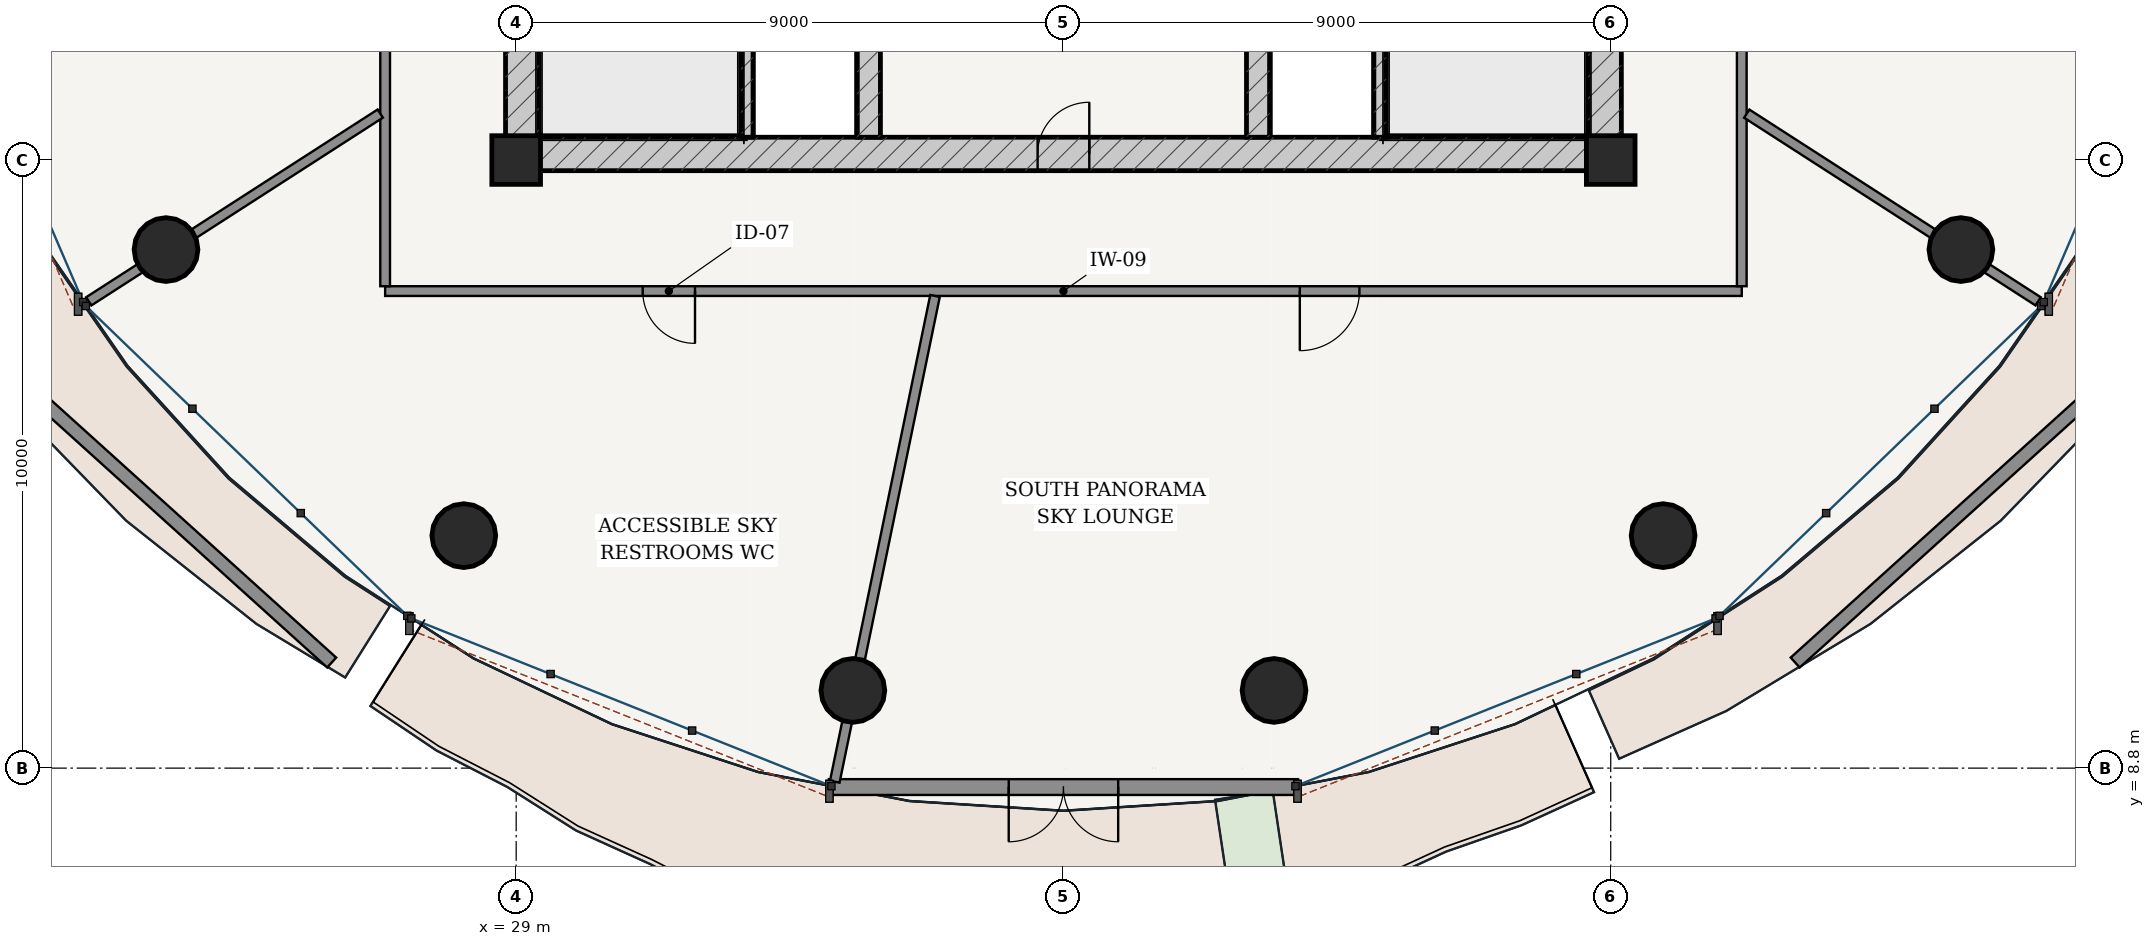
"""IFC4 building model, lengths in metres.
Left out: names, types, materials, properties, quantities, classifications, styles, units other than length and angle.
Written with IfcOpenShell. Run it as: python <this file> out.ifc"""

import sys

from ifc_helpers import new_model, si_unit, direction, frame, frame_2d, origin, origin_2d, place, context, subcontext, project, spatial, rectangle, hollow_circle, extrude, source, transform, mapped, element, fill, save


model = new_model("IFC4")
c1 = context("Model", 3, precision=1e-05, world=origin(), true_north=direction((-0.2419218956, 0.970295726276)))
c2 = subcontext(c1, "Body", "Model", "MODEL_VIEW")
j1 = project(units=[si_unit("LENGTHUNIT", "METRE"), si_unit("PLANEANGLEUNIT", "RADIAN")], contexts=[c1])
p1 = place(None, origin())
s1 = spatial("IfcSite", under=j1, at=p1, CompositionType="ELEMENT")
p2 = place(p1, origin())
s2 = spatial("IfcBuilding", under=s1, at=p2, CompositionType="ELEMENT")
p3 = place(p2, frame((0.0, 0.0, 243.0)))
s3 = spatial("IfcBuildingStorey", under=s2, at=p3, CompositionType="ELEMENT", Elevation=243.0)
for number, where, z_axis, x_axis in (
    (1, (29.0, 18.8, 0.0), (0.0, 0.0, 1.0), (1.0, 0.0, 0.0)),
    (2, (47.0, 18.8, 0.0), (0.0, 0.0, 1.0), (1.0, 0.0, 0.0)),
):
    element("IfcColumn", number, at=place(p3, frame(where, z_axis=z_axis, x_axis=x_axis)), inside=s3, PredefinedType="COLUMN", context=c2, shape_type="SweptSolid", body=[
        extrude(rectangle(XDim=0.8, YDim=0.8, at=origin_2d()), origin(), (0.0, 0.0, 1.0), 5.2),
    ])
p4 = place(p3, frame((28.825, 18.9, 0.0), z_axis=(0.0, 0.0, 1.0), x_axis=(1.0, 0.0, 0.0)))
e3 = element("IfcWall", 3, at=p4, inside=s3, PredefinedType="SHEAR", context=c2, shape_type="SweptSolid", body=[
    extrude(rectangle(XDim=18.35, YDim=0.55, at=frame_2d((9.175, 0.0))), origin(), (0.0, 0.0, 1.0), 4.94),
])
p5 = place(p4, frame((8.75, 0.0, 0.0)))
e4 = element("IfcOpeningElement", 4, at=p5, cuts=e3, PredefinedType="OPENING", context=c2, shape_type="SweptSolid", body=[
    extrude(rectangle(XDim=0.85, YDim=2.1, at=frame_2d((0.425, 1.05))), frame((0.0, 0.285, 0.0), z_axis=(0.0, -1.0, 0.0), x_axis=(1.0, 0.0, 0.0)), (0.0, 0.0, 1.0), 0.57),
])
p6 = place(p3, frame((29.1, 19.175, 0.0), z_axis=(0.0, 0.0, 1.0), x_axis=(0.0, 1.0, 0.0)))
e5 = element("IfcWall", 5, at=p6, inside=s3, PredefinedType="SHEAR", context=c2, shape_type="SweptSolid", body=[
    extrude(rectangle(XDim=15.25, YDim=0.55, at=frame_2d((7.625, 0.0))), origin(), (0.0, 0.0, 1.0), 4.94),
])
p7 = place(p6, frame((9.875, 0.0, 0.0)))
e6 = element("IfcOpeningElement", 6, at=p7, cuts=e5, PredefinedType="OPENING", context=c2, shape_type="SweptSolid", body=[
    extrude(rectangle(XDim=1.5, YDim=2.2, at=frame_2d((0.75, 1.1))), frame((0.0, 0.285, 0.0), z_axis=(0.0, -1.0, 0.0), x_axis=(1.0, 0.0, 0.0)), (0.0, 0.0, 1.0), 0.57),
])
p8 = place(p3, frame((46.9, 19.175, 0.0), z_axis=(0.0, 0.0, 1.0), x_axis=(0.0, 1.0, 0.0)))
e7 = element("IfcWall", 7, at=p8, inside=s3, PredefinedType="SHEAR", context=c2, shape_type="SweptSolid", body=[
    extrude(rectangle(XDim=15.25, YDim=0.55, at=frame_2d((7.625, 0.0))), origin(), (0.0, 0.0, 1.0), 4.94),
])
p9 = place(p8, frame((9.875, 0.0, 0.0)))
e8 = element("IfcOpeningElement", 8, at=p9, cuts=e7, PredefinedType="OPENING", context=c2, shape_type="SweptSolid", body=[
    extrude(rectangle(XDim=1.5, YDim=2.2, at=frame_2d((0.75, 1.1))), frame((0.0, 0.285, 0.0), z_axis=(0.0, -1.0, 0.0), x_axis=(1.0, 0.0, 0.0)), (0.0, 0.0, 1.0), 0.57),
])
for number, where, z_axis, x_axis in (
    (9, (32.795, 19.175, 0.0), (0.0, 0.0, 1.0), (0.0, 1.0, 0.0)),
    (10, (43.205, 19.175, 0.0), (0.0, 0.0, 1.0), (0.0, 1.0, 0.0)),
):
    element("IfcWall", number, at=place(p3, frame(where, z_axis=z_axis, x_axis=x_axis)), inside=s3, PredefinedType="SOLIDWALL", context=c2, shape_type="SweptSolid", body=[
        extrude(rectangle(XDim=7.375, YDim=0.2, at=frame_2d((3.688, 0.0))), origin(), (0.0, 0.0, 1.0), 4.94),
    ])
p10 = place(p3, frame((34.8, 19.175, 0.0), z_axis=(0.0, 0.0, 1.0), x_axis=(0.0, 1.0, 0.0)))
e11 = element("IfcWall", 11, at=p10, inside=s3, PredefinedType="SHEAR", context=c2, shape_type="SweptSolid", body=[
    extrude(rectangle(XDim=15.25, YDim=0.38, at=frame_2d((7.625, 0.0))), origin(), (0.0, 0.0, 1.0), 4.94),
])
p11 = place(p10, frame((7.8, 0.0, 0.0)))
e12 = element("IfcOpeningElement", 12, at=p11, cuts=e11, PredefinedType="OPENING", context=c2, shape_type="SweptSolid", body=[
    extrude(rectangle(XDim=1.05, YDim=2.15, at=frame_2d((0.525, 1.075))), frame((0.0, 0.2, 0.0), z_axis=(0.0, -1.0, 0.0), x_axis=(1.0, 0.0, 0.0)), (0.0, 0.0, 1.0), 0.4),
])
p12 = place(p3, frame((41.2, 19.175, 0.0), z_axis=(0.0, 0.0, 1.0), x_axis=(0.0, 1.0, 0.0)))
e13 = element("IfcWall", 13, at=p12, inside=s3, PredefinedType="SHEAR", context=c2, shape_type="SweptSolid", body=[
    extrude(rectangle(XDim=15.25, YDim=0.38, at=frame_2d((7.625, 0.0))), origin(), (0.0, 0.0, 1.0), 4.94),
])
p13 = place(p12, frame((7.8, 0.0, 0.0)))
e14 = element("IfcOpeningElement", 14, at=p13, cuts=e13, PredefinedType="OPENING", context=c2, shape_type="SweptSolid", body=[
    extrude(rectangle(XDim=1.05, YDim=2.15, at=frame_2d((0.525, 1.075))), frame((0.0, 0.2, 0.0), z_axis=(0.0, -1.0, 0.0), x_axis=(1.0, 0.0, 0.0)), (0.0, 0.0, 1.0), 0.4),
])
for number, where, z_axis, x_axis in (
    (15, (23.241, 17.328, 0.0), (0.0, 0.0, 1.0), (1.0, 0.0, 0.0)),
    (16, (28.139, 12.624, 0.0), (0.0, 0.0, 1.0), (1.0, 0.0, 0.0)),
    (17, (34.537, 10.078, 0.0), (0.0, 0.0, 1.0), (1.0, 0.0, 0.0)),
    (18, (41.463, 10.078, 0.0), (0.0, 0.0, 1.0), (1.0, 0.0, 0.0)),
    (19, (47.861, 12.624, 0.0), (0.0, 0.0, 1.0), (1.0, 0.0, 0.0)),
    (20, (52.759, 17.328, 0.0), (0.0, 0.0, 1.0), (1.0, 0.0, 0.0)),
):
    element("IfcColumn", number, at=place(p3, frame(where, z_axis=z_axis, x_axis=x_axis)), inside=s3, PredefinedType="COLUMN", context=c2, shape_type="SweptSolid", body=[
        extrude(hollow_circle(Radius=0.525, WallThickness=0.035, at=origin_2d()), origin(), (0.0, 0.0, 1.0), 5.2),
    ])
p14 = place(p3, frame((34.141, 8.489, 0.0), z_axis=(0.0, 0.0, 1.0), x_axis=(1.0, 0.0, 0.0)))
e21 = element("IfcWall", 21, at=p14, inside=s3, PredefinedType="SOLIDWALL", context=c2, shape_type="SweptSolid", body=[
    extrude(rectangle(XDim=7.718, YDim=0.26, at=frame_2d((3.859, 0.0))), origin(), (0.0, 0.0, 1.0), 4.94),
])
p15 = place(p14, frame((2.959, 0.0, 0.0)))
e22 = element("IfcOpeningElement", 22, at=p15, cuts=e21, PredefinedType="OPENING", context=c2, shape_type="SweptSolid", body=[
    extrude(rectangle(XDim=1.8, YDim=2.3, at=frame_2d((0.9, 1.15))), frame((0.0, 0.14, 0.0), z_axis=(0.0, -1.0, 0.0), x_axis=(1.0, 0.0, 0.0)), (0.0, 0.0, 1.0), 0.28),
])
for number, where, z_axis, x_axis in (
    (23, (19.99, 15.933, 0.0), (0.0, 0.0, 1.0), (0.742, -0.67, 0.0)),
    (24, (50.034, 10.536, 0.0), (0.0, 0.0, 1.0), (0.742, 0.67, 0.0)),
):
    element("IfcWall", number, at=place(p3, frame(where, z_axis=z_axis, x_axis=x_axis)), inside=s3, PredefinedType="PARAPET", context=c2, shape_type="SweptSolid", body=[
        extrude(rectangle(XDim=8.052, YDim=0.22, at=frame_2d((4.026, 0.0))), origin(), (0.0, 0.0, 1.0), 1.15),
    ])
p16 = place(p3, frame((26.845, 16.645, 0.0), z_axis=(0.0, 0.0, 1.0), x_axis=(1.0, 0.0, 0.0)))
e25 = element("IfcWall", 25, at=p16, inside=s3, PredefinedType="PARTITIONING", context=c2, shape_type="SweptSolid", body=[
    extrude(rectangle(XDim=22.31, YDim=0.16, at=frame_2d((11.155, 0.0))), origin(), (0.0, 0.0, 1.0), 4.465),
])
p17 = place(p16, frame((4.236, 0.0, 0.0)))
e26 = element("IfcOpeningElement", 26, at=p17, cuts=e25, PredefinedType="OPENING", context=c2, shape_type="SweptSolid", body=[
    extrude(rectangle(XDim=0.86, YDim=2.1, at=frame_2d((0.43, 1.05))), frame((0.0, 0.09, 0.0), z_axis=(0.0, -1.0, 0.0), x_axis=(1.0, 0.0, 0.0)), (0.0, 0.0, 1.0), 0.18),
])
p18 = place(p16, frame((15.042, 0.0, 0.0)))
e27 = element("IfcOpeningElement", 27, at=p18, cuts=e25, PredefinedType="OPENING", context=c2, shape_type="SweptSolid", body=[
    extrude(rectangle(XDim=0.98, YDim=2.2, at=frame_2d((0.49, 1.1))), frame((0.0, 0.09, 0.0), z_axis=(0.0, -1.0, 0.0), x_axis=(1.0, 0.0, 0.0)), (0.0, 0.0, 1.0), 0.18),
])
p19 = place(p3, frame((26.845, 16.725, 0.0), z_axis=(0.0, 0.0, 1.0), x_axis=(0.0, 1.0, 0.0)))
e28 = element("IfcWall", 28, at=p19, inside=s3, PredefinedType="PARTITIONING", context=c2, shape_type="SweptSolid", body=[
    extrude(rectangle(XDim=20.15, YDim=0.16, at=frame_2d((10.075, 0.0))), origin(), (0.0, 0.0, 1.0), 4.465),
])
p20 = place(p19, frame((9.585, 0.0, 0.0)))
e29 = element("IfcOpeningElement", 29, at=p20, cuts=e28, PredefinedType="OPENING", context=c2, shape_type="SweptSolid", body=[
    extrude(rectangle(XDim=0.98, YDim=2.2, at=frame_2d((0.49, 1.1))), frame((0.0, 0.09, 0.0), z_axis=(0.0, -1.0, 0.0), x_axis=(1.0, 0.0, 0.0)), (0.0, 0.0, 1.0), 0.18),
])
p21 = place(p3, frame((49.155, 16.725, 0.0), z_axis=(0.0, 0.0, 1.0), x_axis=(0.0, 1.0, 0.0)))
e30 = element("IfcWall", 30, at=p21, inside=s3, PredefinedType="PARTITIONING", context=c2, shape_type="SweptSolid", body=[
    extrude(rectangle(XDim=20.15, YDim=0.16, at=frame_2d((10.075, 0.0))), origin(), (0.0, 0.0, 1.0), 4.465),
])
p22 = place(p21, frame((7.036, 0.0, 0.0)))
e31 = element("IfcOpeningElement", 31, at=p22, cuts=e30, PredefinedType="OPENING", context=c2, shape_type="SweptSolid", body=[
    extrude(rectangle(XDim=0.98, YDim=2.2, at=frame_2d((0.49, 1.1))), frame((0.0, 0.09, 0.0), z_axis=(0.0, -1.0, 0.0), x_axis=(1.0, 0.0, 0.0)), (0.0, 0.0, 1.0), 0.18),
])
p23 = place(p3, frame((26.765, 19.564, 0.0), z_axis=(0.0, 0.0, 1.0), x_axis=(-0.84070098407, -0.541499635627, 0.0)))
e32 = element("IfcWall", 32, at=p23, inside=s3, PredefinedType="PARTITIONING", context=c2, shape_type="SweptSolid", body=[
    extrude(rectangle(XDim=5.702, YDim=0.16, at=frame_2d((2.851, 0.0))), origin(), (0.0, 0.0, 1.0), 4.465),
])
p24 = place(p3, frame((35.888, 16.565, 0.0), z_axis=(0.0, 0.0, 1.0), x_axis=(-0.202098819962, -0.979365134651, 0.0)))
e33 = element("IfcWall", 33, at=p24, inside=s3, PredefinedType="PARTITIONING", context=c2, shape_type="SweptSolid", body=[
    extrude(rectangle(XDim=8.156, YDim=0.16, at=frame_2d((4.078, 0.0))), origin(), (0.0, 0.0, 1.0), 4.465),
])
p25 = place(p3, frame((49.237, 19.563, 0.0), z_axis=(0.0, 0.0, 1.0), x_axis=(0.84072312105, -0.54146526549, 0.0)))
e34 = element("IfcWall", 34, at=p25, inside=s3, PredefinedType="PARTITIONING", context=c2, shape_type="SweptSolid", body=[
    extrude(rectangle(XDim=5.7, YDim=0.16, at=frame_2d((2.85, 0.0))), origin(), (0.0, 0.0, 1.0), 4.465),
])
m1 = source(origin(), c2, "Body", "SweptSolid", [
    extrude(rectangle(XDim=1.8, YDim=2.3, at=frame_2d((0.9, 1.15))), frame((0.0, 0.025, 0.0), z_axis=(0.0, -1.0, 0.0), x_axis=(1.0, 0.0, 0.0)), (0.0, 0.0, 1.0), 0.05),
])
p26 = place(p15, frame((1.8, 0.0, 0.0), z_axis=(0.0, 0.0, 1.0), x_axis=(-1.0, 0.0, 0.0)))
e35 = element("IfcDoor", 35, at=p26, inside=s3, OperationType="DOUBLE_DOOR_SINGLE_SWING", PredefinedType="DOOR", context=c2, shape_type="MappedRepresentation", body=[
    mapped(m1, transform((0.0, 0.0, 0.0), scale=1.0)),
])
fill(e22, e35)
m2 = source(origin(), c2, "Body", "SweptSolid", [
    extrude(rectangle(XDim=0.85, YDim=2.1, at=frame_2d((0.425, 1.05))), frame((0.0, 0.025, 0.0), z_axis=(0.0, -1.0, 0.0), x_axis=(1.0, 0.0, 0.0)), (0.0, 0.0, 1.0), 0.05),
])
p27 = place(p5, origin())
e36 = element("IfcDoor", 36, at=p27, inside=s3, OperationType="SINGLE_SWING_RIGHT", PredefinedType="DOOR", context=c2, shape_type="MappedRepresentation", body=[
    mapped(m2, transform((0.0, 0.0, 0.0), scale=1.0)),
])
fill(e4, e36)
m3 = source(origin(), c2, "Body", "SweptSolid", [
    extrude(rectangle(XDim=0.86, YDim=2.1, at=frame_2d((0.43, 1.05))), frame((0.0, 0.025, 0.0), z_axis=(0.0, -1.0, 0.0), x_axis=(1.0, 0.0, 0.0)), (0.0, 0.0, 1.0), 0.05),
])
p28 = place(p17, frame((0.86, 0.0, 0.0), z_axis=(0.0, 0.0, 1.0), x_axis=(-1.0, 0.0, 0.0)))
e37 = element("IfcDoor", 37, at=p28, inside=s3, OperationType="SINGLE_SWING_LEFT", PredefinedType="DOOR", context=c2, shape_type="MappedRepresentation", body=[
    mapped(m3, transform((0.0, 0.0, 0.0), scale=1.0)),
])
fill(e26, e37)
m4 = source(origin(), c2, "Body", "SweptSolid", [
    extrude(rectangle(XDim=0.98, YDim=2.2, at=frame_2d((0.49, 1.1))), frame((0.0, 0.025, 0.0), z_axis=(0.0, -1.0, 0.0), x_axis=(1.0, 0.0, 0.0)), (0.0, 0.0, 1.0), 0.05),
])
p29 = place(p18, frame((0.98, 0.0, 0.0), z_axis=(0.0, 0.0, 1.0), x_axis=(-1.0, 0.0, 0.0)))
e38 = element("IfcDoor", 38, at=p29, inside=s3, OperationType="SINGLE_SWING_RIGHT", PredefinedType="DOOR", context=c2, shape_type="MappedRepresentation", body=[
    mapped(m4, transform((0.0, 0.0, 0.0), scale=1.0)),
])
fill(e27, e38)
save(model, sys.argv[1])
